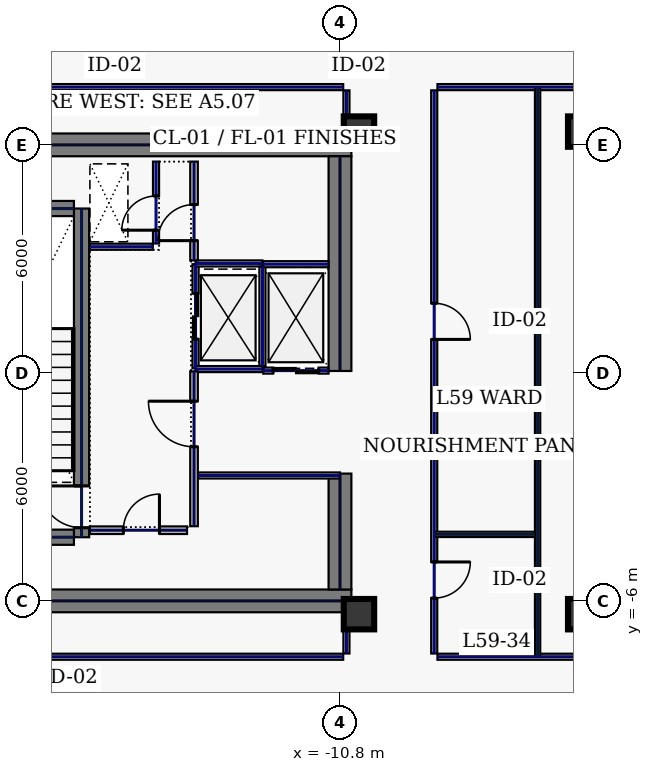
"""IFC4 building model, lengths in metres.
Left out: names, types, materials, properties, quantities, classifications, styles, units other than length and angle.
Written with IfcOpenShell. Run it as: python <this file> out.ifc"""

import sys

from ifc_helpers import new_model, si_unit, direction, frame, frame_2d, origin, origin_2d, place, context, subcontext, project, spatial, rectangle, hollow_rectangle, extrude, element, fill, save


model = new_model("IFC4")
c1 = context("Model", 3, precision=1e-05, world=origin(), true_north=direction((0.0, 1.0)))
c2 = subcontext(c1, "Body", "Model", "MODEL_VIEW")
j1 = project(units=[si_unit("LENGTHUNIT", "METRE"), si_unit("PLANEANGLEUNIT", "RADIAN")], contexts=[c1])
p1 = place(None, origin())
s1 = spatial("IfcSite", under=j1, at=p1, CompositionType="ELEMENT")
p2 = place(p1, origin())
s2 = spatial("IfcBuilding", under=s1, at=p2, CompositionType="ELEMENT")
p3 = place(p2, frame((0.0, 0.0, 255.0)))
s3 = spatial("IfcBuildingStorey", under=s2, at=p3, CompositionType="ELEMENT", Elevation=255.0)
for number, where, z_axis, x_axis in (
    (1, (-22.0, 6.0, 0.0), (0.0, 0.0, 1.0), (1.0, 0.0, 0.0)),
    (2, (-22.0, -6.0, 0.0), (0.0, 0.0, 1.0), (1.0, 0.0, 0.0)),
):
    element("IfcWall", number, at=place(p3, frame(where, z_axis=z_axis, x_axis=x_axis)), inside=s3, PredefinedType="SHEAR", context=c2, shape_type="SweptSolid", body=[
        extrude(rectangle(XDim=11.5, YDim=0.6, at=frame_2d((5.75, 0.0))), origin(), (0.0, 0.0, 1.0), 3.74),
    ])
p4 = place(p3, frame((-10.8, -5.7, 0.0), z_axis=(0.0, 0.0, 1.0), x_axis=(0.0, 1.0, 0.0)))
e3 = element("IfcWall", 3, at=p4, inside=s3, PredefinedType="SHEAR", context=c2, shape_type="SweptSolid", body=[
    extrude(rectangle(XDim=3.05, YDim=0.6, at=frame_2d((1.525, 0.0))), origin(), (0.0, 0.0, 1.0), 3.74),
])
p5 = place(p3, frame((-10.8, 0.05, 0.0), z_axis=(0.0, 0.0, 1.0), x_axis=(0.0, 1.0, 0.0)))
e4 = element("IfcWall", 4, at=p5, inside=s3, PredefinedType="SHEAR", context=c2, shape_type="SweptSolid", body=[
    extrude(rectangle(XDim=5.65, YDim=0.6, at=frame_2d((2.825, 0.0))), origin(), (0.0, 0.0, 1.0), 3.74),
])
p6 = place(p3, frame((-17.6, -4.325, 0.0), z_axis=(0.0, 0.0, 1.0), x_axis=(0.0, 1.0, 0.0)))
e5 = element("IfcWall", 5, at=p6, inside=s3, PredefinedType="SHEAR", context=c2, shape_type="SweptSolid", body=[
    extrude(rectangle(XDim=8.65, YDim=0.4, at=frame_2d((4.325, 0.0))), origin(), (0.0, 0.0, 1.0), 3.74),
])
p7 = place(p6, frame((0.25, 0.0, 0.0)))
e6 = element("IfcOpeningElement", 6, at=p7, cuts=e5, PredefinedType="OPENING", context=c2, shape_type="SweptSolid", body=[
    extrude(rectangle(XDim=1.1, YDim=2.2, at=frame_2d((0.55, 1.1))), frame((0.0, 0.21, 0.0), z_axis=(0.0, -1.0, 0.0), x_axis=(1.0, 0.0, 0.0)), (0.0, 0.0, 1.0), 0.42),
])
for number, where, z_axis, x_axis in (
    (7, (-21.2, -4.325, 0.0), (0.0, 0.0, 1.0), (1.0, 0.0, 0.0)),
    (8, (-21.2, 4.325, 0.0), (0.0, 0.0, 1.0), (1.0, 0.0, 0.0)),
):
    element("IfcWall", number, at=place(p3, frame(where, z_axis=z_axis, x_axis=x_axis)), inside=s3, PredefinedType="SHEAR", context=c2, shape_type="SweptSolid", body=[
        extrude(rectangle(XDim=3.4, YDim=0.4, at=frame_2d((1.7, 0.0))), origin(), (0.0, 0.0, 1.0), 3.74),
    ])
for number, where, z_axis, x_axis in (
    (9, (-10.3, -6.35, 0.0), (0.0, 0.0, 1.0), (1.0, 0.0, 0.0)),
    (10, (-10.3, 6.35, 0.0), (0.0, 0.0, 1.0), (1.0, 0.0, 0.0)),
    (11, (-4.4, -6.35, 0.0), (0.0, 0.0, 1.0), (1.0, 0.0, 0.0)),
    (12, (-4.4, 6.35, 0.0), (0.0, 0.0, 1.0), (1.0, 0.0, 0.0)),
):
    element("IfcColumn", number, at=place(p3, frame(where, z_axis=z_axis, x_axis=x_axis)), inside=s3, PredefinedType="COLUMN", context=c2, shape_type="SweptSolid", body=[
        extrude(hollow_rectangle(XDim=0.8, YDim=0.8, WallThickness=0.036, at=origin_2d()), origin(), (0.0, 0.0, 1.0), 3.74),
    ])
p8 = place(p3, frame((-14.6, 0.12, 0.0), z_axis=(0.0, 0.0, 1.0), x_axis=(0.0, 1.0, 0.0)))
e13 = element("IfcWall", 13, at=p8, inside=s3, PredefinedType="PARTITIONING", context=c2, shape_type="SweptSolid", body=[
    extrude(rectangle(XDim=2.74, YDim=0.16, at=frame_2d((1.37, 0.0))), origin(), (0.0, 0.0, 1.0), 3.74),
])
p9 = place(p8, frame((0.77, 0.0, 0.0)))
e14 = element("IfcOpeningElement", 14, at=p9, cuts=e13, PredefinedType="OPENING", context=c2, shape_type="SweptSolid", body=[
    extrude(rectangle(XDim=1.2, YDim=2.2, at=frame_2d((0.6, 1.1))), frame((0.0, 0.09, 0.0), z_axis=(0.0, -1.0, 0.0), x_axis=(1.0, 0.0, 0.0)), (0.0, 0.0, 1.0), 0.18),
])
for number, where, z_axis, x_axis in (
    (15, (-14.6, 0.1, 0.0), (0.0, 0.0, 1.0), (1.0, 0.0, 0.0)),
    (16, (-14.6, 2.88, 0.0), (0.0, 0.0, 1.0), (1.0, 0.0, 0.0)),
):
    element("IfcWall", number, at=place(p3, frame(where, z_axis=z_axis, x_axis=x_axis)), inside=s3, PredefinedType="PARTITIONING", context=c2, shape_type="SweptSolid", body=[
        extrude(rectangle(XDim=1.76, YDim=0.16, at=frame_2d((0.88, 0.0))), origin(), (0.0, 0.0, 1.0), 3.74),
    ])
p10 = place(p3, frame((-12.84, 0.18, 0.0), z_axis=(0.0, 0.0, 1.0), x_axis=(0.0, 1.0, 0.0)))
e17 = element("IfcWall", 17, at=p10, inside=s3, PredefinedType="PARTITIONING", context=c2, shape_type="SweptSolid", body=[
    extrude(rectangle(XDim=2.62, YDim=0.16, at=frame_2d((1.31, 0.0))), origin(), (0.0, 0.0, 1.0), 3.74),
])
p11 = place(p3, frame((-12.82, 0.06, 0.0), z_axis=(0.0, 0.0, 1.0), x_axis=(1.0, 0.0, 0.0)))
e18 = element("IfcWall", 18, at=p11, inside=s3, PredefinedType="PARTITIONING", context=c2, shape_type="SweptSolid", body=[
    extrude(rectangle(XDim=1.72, YDim=0.16, at=frame_2d((0.86, 0.0))), origin(), (0.0, 0.0, 1.0), 3.74),
])
p12 = place(p11, frame((0.26, 0.0, 0.0)))
e19 = element("IfcOpeningElement", 19, at=p12, cuts=e18, PredefinedType="OPENING", context=c2, shape_type="SweptSolid", body=[
    extrude(rectangle(XDim=1.2, YDim=2.2, at=frame_2d((0.6, 1.1))), frame((0.0, 0.09, 0.0), z_axis=(0.0, -1.0, 0.0), x_axis=(1.0, 0.0, 0.0)), (0.0, 0.0, 1.0), 0.18),
])
p13 = place(p3, frame((-12.82, 2.86, 0.0), z_axis=(0.0, 0.0, 1.0), x_axis=(1.0, 0.0, 0.0)))
e20 = element("IfcWall", 20, at=p13, inside=s3, PredefinedType="PARTITIONING", context=c2, shape_type="SweptSolid", body=[
    extrude(rectangle(XDim=1.72, YDim=0.16, at=frame_2d((0.86, 0.0))), origin(), (0.0, 0.0, 1.0), 3.74),
])
p14 = place(p3, frame((-15.64, 3.405, 0.0), z_axis=(0.0, 0.0, 1.0), x_axis=(0.0, 1.0, 0.0)))
e21 = element("IfcWall", 21, at=p14, inside=s3, PredefinedType="PARTITIONING", context=c2, shape_type="SweptSolid", body=[
    extrude(rectangle(XDim=2.155, YDim=0.16, at=frame_2d((1.078, 0.0))), origin(), (0.0, 0.0, 1.0), 3.74),
])
p15 = place(p14, frame((0.35, 0.0, 0.0)))
e22 = element("IfcOpeningElement", 22, at=p15, cuts=e21, PredefinedType="OPENING", context=c2, shape_type="SweptSolid", body=[
    extrude(rectangle(XDim=0.9, YDim=2.2, at=frame_2d((0.45, 1.1))), frame((0.0, 0.09, 0.0), z_axis=(0.0, -1.0, 0.0), x_axis=(1.0, 0.0, 0.0)), (0.0, 0.0, 1.0), 0.18),
])
p16 = place(p3, frame((-17.38, 3.32, 0.0), z_axis=(0.0, 0.0, 1.0), x_axis=(1.0, 0.0, 0.0)))
e23 = element("IfcWall", 23, at=p16, inside=s3, PredefinedType="PARTITIONING", context=c2, shape_type="SweptSolid", body=[
    extrude(rectangle(XDim=1.655, YDim=0.16, at=frame_2d((0.827, 0.0))), origin(), (0.0, 0.0, 1.0), 3.74),
])
p17 = place(p3, frame((-17.38, -4.14, 0.0), z_axis=(0.0, 0.0, 1.0), x_axis=(1.0, 0.0, 0.0)))
e24 = element("IfcWall", 24, at=p17, inside=s3, PredefinedType="SOLIDWALL", context=c2, shape_type="SweptSolid", body=[
    extrude(rectangle(XDim=2.555, YDim=0.2, at=frame_2d((1.277, 0.0))), origin(), (0.0, 0.0, 1.0), 3.74),
])
p18 = place(p17, frame((0.88, 0.0, 0.0)))
e25 = element("IfcOpeningElement", 25, at=p18, cuts=e24, PredefinedType="OPENING", context=c2, shape_type="SweptSolid", body=[
    extrude(rectangle(XDim=0.95, YDim=2.2, at=frame_2d((0.475, 1.1))), frame((0.0, 0.11, 0.0), z_axis=(0.0, -1.0, 0.0), x_axis=(1.0, 0.0, 0.0)), (0.0, 0.0, 1.0), 0.22),
])
p19 = place(p3, frame((-14.535, -2.7, 0.0), z_axis=(0.0, 0.0, 1.0), x_axis=(1.0, 0.0, 0.0)))
e26 = element("IfcWall", 26, at=p19, inside=s3, PredefinedType="PARTITIONING", context=c2, shape_type="SweptSolid", body=[
    extrude(rectangle(XDim=3.735, YDim=0.16, at=frame_2d((1.867, 0.0))), origin(), (0.0, 0.0, 1.0), 3.74),
])
p20 = place(p3, frame((-14.64, 2.96, 0.0), z_axis=(0.0, 0.0, 1.0), x_axis=(0.0, 1.0, 0.0)))
e27 = element("IfcWall", 27, at=p20, inside=s3, PredefinedType="SOLIDWALL", context=c2, shape_type="SweptSolid", body=[
    extrude(rectangle(XDim=2.6, YDim=0.2, at=frame_2d((1.3, 0.0))), origin(), (0.0, 0.0, 1.0), 3.74),
])
p21 = place(p20, frame((0.52, 0.0, 0.0)))
e28 = element("IfcOpeningElement", 28, at=p21, cuts=e27, PredefinedType="OPENING", context=c2, shape_type="SweptSolid", body=[
    extrude(rectangle(XDim=0.95, YDim=2.2, at=frame_2d((0.475, 1.1))), frame((0.0, 0.11, 0.0), z_axis=(0.0, -1.0, 0.0), x_axis=(1.0, 0.0, 0.0)), (0.0, 0.0, 1.0), 0.22),
])
p22 = place(p3, frame((-14.64, -4.035, 0.0), z_axis=(0.0, 0.0, 1.0), x_axis=(0.0, 1.0, 0.0)))
e29 = element("IfcWall", 29, at=p22, inside=s3, PredefinedType="SOLIDWALL", context=c2, shape_type="SweptSolid", body=[
    extrude(rectangle(XDim=4.075, YDim=0.2, at=frame_2d((2.038, 0.0))), origin(), (0.0, 0.0, 1.0), 3.74),
])
p23 = place(p22, frame((2.09, 0.0, 0.0)))
e30 = element("IfcOpeningElement", 30, at=p23, cuts=e29, PredefinedType="OPENING", context=c2, shape_type="SweptSolid", body=[
    extrude(rectangle(XDim=1.2, YDim=2.2, at=frame_2d((0.6, 1.1))), frame((0.0, 0.11, 0.0), z_axis=(0.0, -1.0, 0.0), x_axis=(1.0, 0.0, 0.0)), (0.0, 0.0, 1.0), 0.22),
])
p24 = place(p3, frame((-3.965, 7.52, 0.0), z_axis=(0.0, 0.0, 1.0), x_axis=(-1.0, 0.0, 0.0)))
e31 = element("IfcWall", 31, at=p24, inside=s3, PredefinedType="PARTITIONING", context=c2, shape_type="SweptSolid", body=[
    extrude(rectangle(XDim=4.27, YDim=0.16, at=frame_2d((2.135, 0.0))), origin(), (0.0, 0.0, 1.0), 3.74),
])
p25 = place(p3, frame((-8.32, 7.435, 0.0), z_axis=(0.0, 0.0, 1.0), x_axis=(0.0, -1.0, 0.0)))
e32 = element("IfcWall", 32, at=p25, inside=s3, PredefinedType="PARTITIONING", context=c2, shape_type="SweptSolid", body=[
    extrude(rectangle(XDim=14.82, YDim=0.16, at=frame_2d((7.41, 0.0))), origin(), (0.0, 0.0, 1.0), 3.74),
])
p26 = place(p25, frame((12.411, 0.0, 0.0)))
e33 = element("IfcOpeningElement", 33, at=p26, cuts=e32, PredefinedType="OPENING", context=c2, shape_type="SweptSolid", body=[
    extrude(rectangle(XDim=0.95, YDim=2.2, at=frame_2d((0.475, 1.1))), frame((0.0, 0.09, 0.0), z_axis=(0.0, -1.0, 0.0), x_axis=(1.0, 0.0, 0.0)), (0.0, 0.0, 1.0), 0.18),
])
p27 = place(p25, frame((5.604, 0.0, 0.0)))
e34 = element("IfcOpeningElement", 34, at=p27, cuts=e32, PredefinedType="OPENING", context=c2, shape_type="SweptSolid", body=[
    extrude(rectangle(XDim=0.95, YDim=2.2, at=frame_2d((0.475, 1.1))), frame((0.0, 0.09, 0.0), z_axis=(0.0, -1.0, 0.0), x_axis=(1.0, 0.0, 0.0)), (0.0, 0.0, 1.0), 0.18),
])
p28 = place(p3, frame((-8.235, -7.47, 0.0), z_axis=(0.0, 0.0, 1.0), x_axis=(1.0, 0.0, 0.0)))
e35 = element("IfcWall", 35, at=p28, inside=s3, PredefinedType="PARTITIONING", context=c2, shape_type="SweptSolid", body=[
    extrude(rectangle(XDim=4.27, YDim=0.16, at=frame_2d((2.135, 0.0))), origin(), (0.0, 0.0, 1.0), 3.74),
])
p29 = place(p3, frame((-10.63, -7.385, 0.0), z_axis=(0.0, 0.0, 1.0), x_axis=(0.0, 1.0, 0.0)))
e36 = element("IfcWall", 36, at=p29, inside=s3, PredefinedType="PARTITIONING", context=c2, shape_type="SweptSolid", body=[
    extrude(rectangle(XDim=0.965, YDim=0.16, at=frame_2d((0.482, 0.0))), origin(), (0.0, 0.0, 1.0), 3.74),
])
p30 = place(p3, frame((-10.63, 6.42, 0.0), z_axis=(0.0, 0.0, 1.0), x_axis=(0.0, 1.0, 0.0)))
e37 = element("IfcWall", 37, at=p30, inside=s3, PredefinedType="PARTITIONING", context=c2, shape_type="SweptSolid", body=[
    extrude(rectangle(XDim=1.015, YDim=0.16, at=frame_2d((0.508, 0.0))), origin(), (0.0, 0.0, 1.0), 3.74),
])
for number, where, z_axis, x_axis in (
    (38, (-10.715, 7.52, 0.0), (0.0, 0.0, 1.0), (-1.0, 0.0, 0.0)),
    (39, (-22.585, -7.47, 0.0), (0.0, 0.0, 1.0), (1.0, 0.0, 0.0)),
):
    element("IfcWall", number, at=place(p3, frame(where, z_axis=z_axis, x_axis=x_axis)), inside=s3, PredefinedType="PARTITIONING", context=c2, shape_type="SweptSolid", body=[
        extrude(rectangle(XDim=11.87, YDim=0.16, at=frame_2d((5.935, 0.0))), origin(), (0.0, 0.0, 1.0), 3.74),
    ])
p31 = place(p3, frame((-5.6, -7.465, 0.0), z_axis=(0.0, 0.0, 1.0), x_axis=(0.0, 1.0, 0.0)))
e40 = element("IfcWall", 40, at=p31, inside=s3, PredefinedType="PARTITIONING", context=c2, shape_type="SweptSolid", body=[
    extrude(rectangle(XDim=14.98, YDim=0.14, at=frame_2d((7.49, 0.0))), origin(), (0.0, 0.0, 1.0), 3.74),
])
p32 = place(p3, frame((-8.315, -4.25, 0.0), z_axis=(0.0, 0.0, 1.0), x_axis=(1.0, 0.0, 0.0)))
e41 = element("IfcWall", 41, at=p32, inside=s3, PredefinedType="PARTITIONING", context=c2, shape_type="SweptSolid", body=[
    extrude(rectangle(XDim=2.64, YDim=0.14, at=frame_2d((1.32, 0.0))), origin(), (0.0, 0.0, 1.0), 3.74),
])
p33 = place(p7, origin())
e42 = element("IfcDoor", 42, at=p33, inside=s3, OperationType="SINGLE_SWING_RIGHT", PredefinedType="DOOR", context=c2, shape_type="SweptSolid", body=[
    extrude(rectangle(XDim=1.1, YDim=2.2, at=frame_2d((0.55, 1.1))), frame((0.0, 0.025, 0.0), z_axis=(0.0, -1.0, 0.0), x_axis=(1.0, 0.0, 0.0)), (0.0, 0.0, 1.0), 0.05),
])
fill(e6, e42)
p34 = place(p9, origin())
e43 = element("IfcDoor", 43, at=p34, inside=s3, OperationType="SLIDING_TO_LEFT", PredefinedType="DOOR", context=c2, shape_type="SweptSolid", body=[
    extrude(rectangle(XDim=1.2, YDim=2.2, at=frame_2d((0.6, 1.1))), frame((0.0, 0.025, 0.0), z_axis=(0.0, -1.0, 0.0), x_axis=(1.0, 0.0, 0.0)), (0.0, 0.0, 1.0), 0.05),
])
fill(e14, e43)
p35 = place(p12, origin())
e44 = element("IfcDoor", 44, at=p35, inside=s3, OperationType="SLIDING_TO_LEFT", PredefinedType="DOOR", context=c2, shape_type="SweptSolid", body=[
    extrude(rectangle(XDim=1.2, YDim=2.2, at=frame_2d((0.6, 1.1))), frame((0.0, 0.025, 0.0), z_axis=(0.0, -1.0, 0.0), x_axis=(1.0, 0.0, 0.0)), (0.0, 0.0, 1.0), 0.05),
])
fill(e19, e44)
p36 = place(p15, origin())
e45 = element("IfcDoor", 45, at=p36, inside=s3, OperationType="SINGLE_SWING_LEFT", PredefinedType="DOOR", context=c2, shape_type="SweptSolid", body=[
    extrude(rectangle(XDim=0.9, YDim=2.2, at=frame_2d((0.45, 1.1))), frame((0.0, 0.025, 0.0), z_axis=(0.0, -1.0, 0.0), x_axis=(1.0, 0.0, 0.0)), (0.0, 0.0, 1.0), 0.05),
])
fill(e22, e45)
p37 = place(p18, origin())
e46 = element("IfcDoor", 46, at=p37, inside=s3, OperationType="SINGLE_SWING_RIGHT", PredefinedType="DOOR", context=c2, shape_type="SweptSolid", body=[
    extrude(rectangle(XDim=0.95, YDim=2.2, at=frame_2d((0.475, 1.1))), frame((0.0, 0.025, 0.0), z_axis=(0.0, -1.0, 0.0), x_axis=(1.0, 0.0, 0.0)), (0.0, 0.0, 1.0), 0.05),
])
fill(e25, e46)
p38 = place(p21, origin())
e47 = element("IfcDoor", 47, at=p38, inside=s3, OperationType="SINGLE_SWING_LEFT", PredefinedType="DOOR", context=c2, shape_type="SweptSolid", body=[
    extrude(rectangle(XDim=0.95, YDim=2.2, at=frame_2d((0.475, 1.1))), frame((0.0, 0.025, 0.0), z_axis=(0.0, -1.0, 0.0), x_axis=(1.0, 0.0, 0.0)), (0.0, 0.0, 1.0), 0.05),
])
fill(e28, e47)
p39 = place(p23, origin())
e48 = element("IfcDoor", 48, at=p39, inside=s3, OperationType="SINGLE_SWING_RIGHT", PredefinedType="DOOR", context=c2, shape_type="SweptSolid", body=[
    extrude(rectangle(XDim=1.2, YDim=2.2, at=frame_2d((0.6, 1.1))), frame((0.0, 0.025, 0.0), z_axis=(0.0, -1.0, 0.0), x_axis=(1.0, 0.0, 0.0)), (0.0, 0.0, 1.0), 0.05),
])
fill(e30, e48)
p40 = place(p26, origin())
e49 = element("IfcDoor", 49, at=p40, inside=s3, OperationType="SINGLE_SWING_LEFT", PredefinedType="DOOR", context=c2, shape_type="SweptSolid", body=[
    extrude(rectangle(XDim=0.95, YDim=2.2, at=frame_2d((0.475, 1.1))), frame((0.0, 0.025, 0.0), z_axis=(0.0, -1.0, 0.0), x_axis=(1.0, 0.0, 0.0)), (0.0, 0.0, 1.0), 0.05),
])
fill(e33, e49)
p41 = place(p27, origin())
e50 = element("IfcDoor", 50, at=p41, inside=s3, OperationType="SINGLE_SWING_RIGHT", PredefinedType="DOOR", context=c2, shape_type="SweptSolid", body=[
    extrude(rectangle(XDim=0.95, YDim=2.2, at=frame_2d((0.475, 1.1))), frame((0.0, 0.025, 0.0), z_axis=(0.0, -1.0, 0.0), x_axis=(1.0, 0.0, 0.0)), (0.0, 0.0, 1.0), 0.05),
])
fill(e34, e50)
save(model, sys.argv[1])
